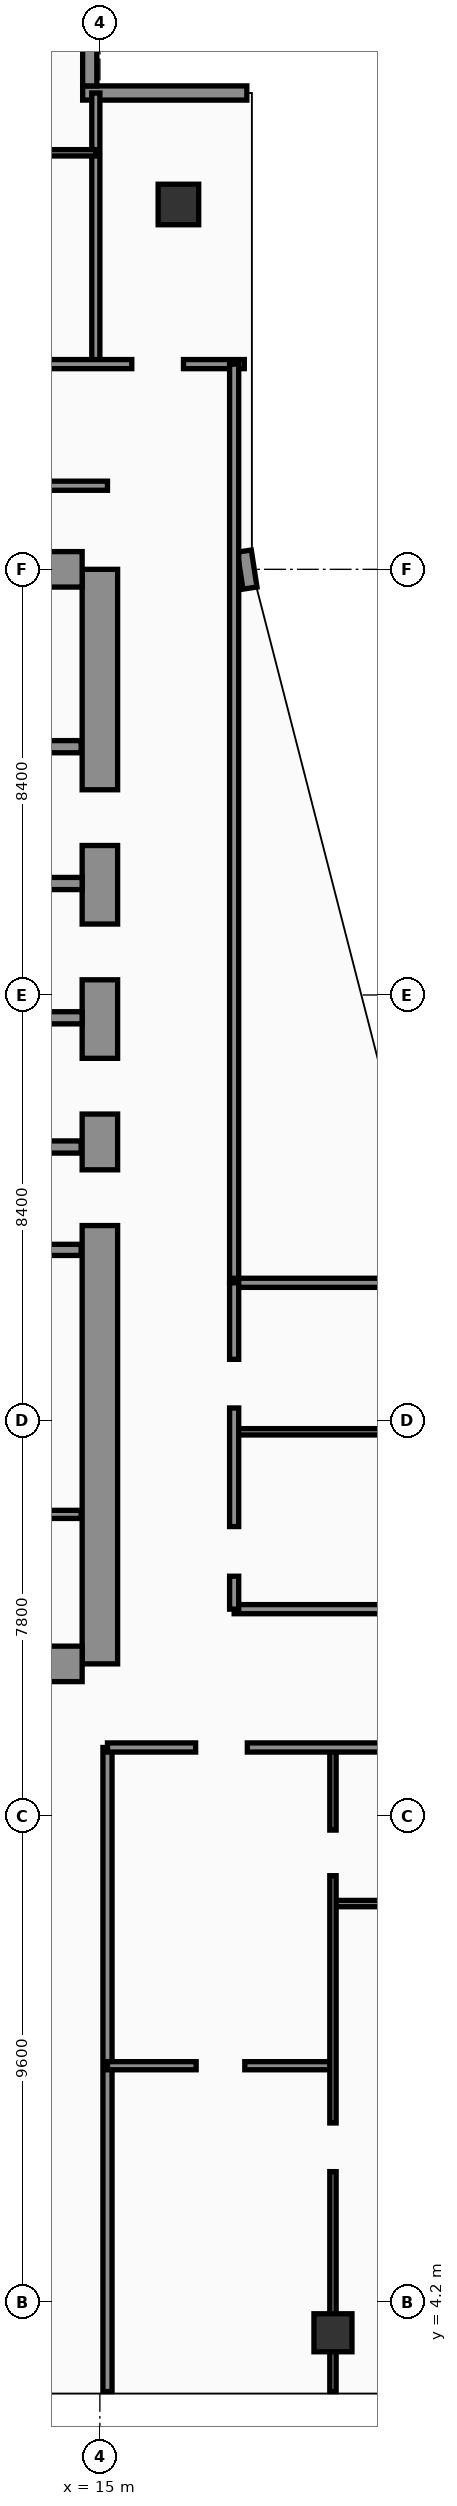
"""IFC4 building model, lengths in metres.
Left out: names, types, materials, properties, quantities, classifications, styles, units other than length and angle.
Written with IfcOpenShell. Run it as: python <this file> out.ifc"""

import sys

from ifc_helpers import new_model, si_unit, direction, frame, frame_2d, origin, origin_2d, place, context, subcontext, project, spatial, rectangle, hollow_rectangle, extrude, element, fill, save


model = new_model("IFC4")
c1 = context("Model", 3, precision=1e-05, world=origin(), true_north=direction((0.0, 1.0)))
c2 = subcontext(c1, "Body", "Model", "MODEL_VIEW")
j1 = project(units=[si_unit("LENGTHUNIT", "METRE"), si_unit("PLANEANGLEUNIT", "RADIAN")], contexts=[c1])
p1 = place(None, origin())
s1 = spatial("IfcSite", under=j1, at=p1, CompositionType="ELEMENT")
p2 = place(p1, origin())
s2 = spatial("IfcBuilding", under=s1, at=p2, CompositionType="ELEMENT")
p3 = place(p2, frame((0.0, 0.0, 211.0)))
s3 = spatial("IfcBuildingStorey", under=s2, at=p3, CompositionType="ELEMENT", Elevation=211.0)
p4 = place(p3, frame((15.0, 16.8, 0.0), z_axis=(0.0, 0.0, 1.0), x_axis=(0.0, 1.0, 0.0)))
e1 = element("IfcWall", 1, at=p4, inside=s3, PredefinedType="SHEAR", context=c2, shape_type="SweptSolid", body=[
    extrude(rectangle(XDim=21.6, YDim=0.7, at=frame_2d((10.8, 0.0))), origin(), (0.0, 0.0, 1.0), 3.56),
])
p5 = place(p4, frame((8.65, 0.0, 0.0)))
e2 = element("IfcOpeningElement", 2, at=p5, cuts=e1, PredefinedType="OPENING", context=c2, shape_type="SweptSolid", body=[
    extrude(rectangle(XDim=1.1, YDim=2.2, at=frame_2d((0.55, 1.1))), frame((0.0, 0.36, 0.0), z_axis=(0.0, -1.0, 0.0), x_axis=(1.0, 0.0, 0.0)), (0.0, 0.0, 1.0), 0.72),
])
p6 = place(p4, frame((10.85, 0.0, 0.0)))
e3 = element("IfcOpeningElement", 3, at=p6, cuts=e1, PredefinedType="OPENING", context=c2, shape_type="SweptSolid", body=[
    extrude(rectangle(XDim=1.1, YDim=2.2, at=frame_2d((0.55, 1.1))), frame((0.0, 0.36, 0.0), z_axis=(0.0, -1.0, 0.0), x_axis=(1.0, 0.0, 0.0)), (0.0, 0.0, 1.0), 0.72),
])
p7 = place(p4, frame((13.5, 0.0, 0.0)))
e4 = element("IfcOpeningElement", 4, at=p7, cuts=e1, PredefinedType="OPENING", context=c2, shape_type="SweptSolid", body=[
    extrude(rectangle(XDim=1.1, YDim=2.2, at=frame_2d((0.55, 1.1))), frame((0.0, 0.36, 0.0), z_axis=(0.0, -1.0, 0.0), x_axis=(1.0, 0.0, 0.0)), (0.0, 0.0, 1.0), 0.72),
])
p8 = place(p4, frame((16.15, 0.0, 0.0)))
e5 = element("IfcOpeningElement", 5, at=p8, cuts=e1, PredefinedType="OPENING", context=c2, shape_type="SweptSolid", body=[
    extrude(rectangle(XDim=1.1, YDim=2.2, at=frame_2d((0.55, 1.1))), frame((0.0, 0.36, 0.0), z_axis=(0.0, -1.0, 0.0), x_axis=(1.0, 0.0, 0.0)), (0.0, 0.0, 1.0), 0.72),
])
for number, where, z_axis, x_axis in (
    (6, (4.55, 38.4, 0.0), (0.0, 0.0, 1.0), (1.0, 0.0, 0.0)),
    (7, (4.55, 16.8, 0.0), (0.0, 0.0, 1.0), (1.0, 0.0, 0.0)),
):
    element("IfcWall", number, at=place(p3, frame(where, z_axis=z_axis, x_axis=x_axis)), inside=s3, PredefinedType="SHEAR", context=c2, shape_type="SweptSolid", body=[
        extrude(rectangle(XDim=10.1, YDim=0.7, at=frame_2d((5.05, 0.0))), origin(), (0.0, 0.0, 1.0), 3.56),
    ])
for number, where, z_axis, x_axis in (
    (8, (12.18, 29.55, 0.0), (0.0, 0.0, 1.0), (1.0, 0.0, 0.0)),
    (9, (12.18, 32.2, 0.0), (0.0, 0.0, 1.0), (1.0, 0.0, 0.0)),
):
    element("IfcWall", number, at=place(p3, frame(where, z_axis=z_axis, x_axis=x_axis)), inside=s3, PredefinedType="SOLIDWALL", context=c2, shape_type="SweptSolid", body=[
        extrude(rectangle(XDim=2.47, YDim=0.24, at=frame_2d((1.235, 0.0))), origin(), (0.0, 0.0, 1.0), 3.56),
    ])
p9 = place(p3, frame((16.55, 45.6, 0.0), z_axis=(0.0, 0.0, 1.0), x_axis=(1.0, 0.0, 0.0)))
e10 = element("IfcColumn", 10, at=p9, inside=s3, PredefinedType="COLUMN", context=c2, shape_type="SweptSolid", body=[
    extrude(rectangle(XDim=0.8, YDim=0.8, at=origin_2d()), origin(), (0.0, 0.0, 1.0), 3.56),
])
p10 = place(p3, frame((19.6, 3.6, 0.0), z_axis=(0.0, 0.0, 1.0), x_axis=(1.0, 0.0, 0.0)))
e11 = element("IfcColumn", 11, at=p10, inside=s3, PredefinedType="COLUMN", context=c2, shape_type="SweptSolid", body=[
    extrude(hollow_rectangle(XDim=0.75, YDim=0.75, WallThickness=0.032, at=origin_2d()), origin(), (0.0, 0.0, 1.0), 3.56),
])
p11 = place(p3, frame((17.962, 38.03, 0.0), z_axis=(0.0, 0.0, 1.0), x_axis=(-0.15141125477, 0.988470855377, 0.0)))
e12 = element("IfcWall", 12, at=p11, inside=s3, PredefinedType="SOLIDWALL", context=c2, shape_type="SweptSolid", body=[
    extrude(rectangle(XDim=0.739, YDim=0.28, at=frame_2d((0.369, 0.0))), origin(), (0.0, 0.0, 1.0), 3.56),
])
p12 = place(p3, frame((17.9, 47.8, 0.0), z_axis=(0.0, 0.0, 1.0), x_axis=(-1.0, 0.0, 0.0)))
e13 = element("IfcWall", 13, at=p12, inside=s3, PredefinedType="SOLIDWALL", context=c2, shape_type="SweptSolid", body=[
    extrude(rectangle(XDim=3.24, YDim=0.28, at=frame_2d((1.62, 0.0))), origin(), (0.0, 0.0, 1.0), 3.56),
])
p13 = place(p3, frame((14.8, 47.94, 0.0), z_axis=(0.0, 0.0, 1.0), x_axis=(0.0, 1.0, 0.0)))
e14 = element("IfcWall", 14, at=p13, inside=s3, PredefinedType="SOLIDWALL", context=c2, shape_type="SweptSolid", body=[
    extrude(rectangle(XDim=2.94, YDim=0.28, at=frame_2d((1.47, 0.0))), origin(), (0.0, 0.0, 1.0), 3.56),
])
p14 = place(p3, frame((9.68, 19.75, 0.0), z_axis=(0.0, 0.0, 1.0), x_axis=(1.0, 0.0, 0.0)))
e15 = element("IfcWall", 15, at=p14, inside=s3, PredefinedType="PARTITIONING", context=c2, shape_type="SweptSolid", body=[
    extrude(rectangle(XDim=4.95, YDim=0.16, at=frame_2d((2.475, 0.0))), origin(), (0.0, 0.0, 1.0), 3.56),
])
p15 = place(p14, frame((1.1, 0.0, 0.0)))
e16 = element("IfcOpeningElement", 16, at=p15, cuts=e15, PredefinedType="OPENING", context=c2, shape_type="SweptSolid", body=[
    extrude(rectangle(XDim=0.98, YDim=2.15, at=frame_2d((0.49, 1.075))), frame((0.0, 0.09, 0.0), z_axis=(0.0, -1.0, 0.0), x_axis=(1.0, 0.0, 0.0)), (0.0, 0.0, 1.0), 0.18),
])
p16 = place(p3, frame((9.68, 24.97, 0.0), z_axis=(0.0, 0.0, 1.0), x_axis=(1.0, 0.0, 0.0)))
e17 = element("IfcWall", 17, at=p16, inside=s3, PredefinedType="SOLIDWALL", context=c2, shape_type="SweptSolid", body=[
    extrude(rectangle(XDim=4.95, YDim=0.22, at=frame_2d((2.475, 0.0))), origin(), (0.0, 0.0, 1.0), 2.94),
])
p17 = place(p16, frame((0.9, 0.0, 0.0)))
e18 = element("IfcOpeningElement", 18, at=p17, cuts=e17, PredefinedType="OPENING", context=c2, shape_type="SweptSolid", body=[
    extrude(rectangle(XDim=0.98, YDim=2.15, at=frame_2d((0.49, 1.075))), frame((0.0, 0.12, 0.0), z_axis=(0.0, -1.0, 0.0), x_axis=(1.0, 0.0, 0.0)), (0.0, 0.0, 1.0), 0.24),
])
p18 = place(p3, frame((12.25, 27.0, 0.0), z_axis=(0.0, 0.0, 1.0), x_axis=(1.0, 0.0, 0.0)))
e19 = element("IfcWall", 19, at=p18, inside=s3, PredefinedType="SOLIDWALL", context=c2, shape_type="SweptSolid", body=[
    extrude(rectangle(XDim=2.38, YDim=0.24, at=frame_2d((1.19, 0.0))), origin(), (0.0, 0.0, 1.0), 3.56),
])
p19 = place(p3, frame((9.66, 34.9, 0.0), z_axis=(0.0, 0.0, 1.0), x_axis=(1.0, 0.0, 0.0)))
e20 = element("IfcWall", 20, at=p19, inside=s3, PredefinedType="SOLIDWALL", context=c2, shape_type="SweptSolid", body=[
    extrude(rectangle(XDim=4.97, YDim=0.24, at=frame_2d((2.485, 0.0))), origin(), (0.0, 0.0, 1.0), 3.56),
])
p20 = place(p3, frame((15.15, 2.44, 0.0), z_axis=(0.0, 0.0, 1.0), x_axis=(0.0, 1.0, 0.0)))
e21 = element("IfcWall", 21, at=p20, inside=s3, PredefinedType="PARTITIONING", context=c2, shape_type="SweptSolid", body=[
    extrude(rectangle(XDim=12.71, YDim=0.18, at=frame_2d((6.355, 0.0))), origin(), (0.0, 0.0, 1.0), 3.09),
])
p21 = place(p3, frame((19.6, 12.07, 0.0), z_axis=(0.0, 0.0, 1.0), x_axis=(1.0, 0.0, 0.0)))
e22 = element("IfcWall", 22, at=p21, inside=s3, PredefinedType="PARTITIONING", context=c2, shape_type="SweptSolid", body=[
    extrude(rectangle(XDim=2.0, YDim=0.125, at=frame_2d((1.0, 0.0))), origin(), (0.0, 0.0, 1.0), 3.56),
])
p22 = place(p3, frame((15.15, 8.87, 0.0), z_axis=(0.0, 0.0, 1.0), x_axis=(1.0, 0.0, 0.0)))
e23 = element("IfcWall", 23, at=p22, inside=s3, PredefinedType="PARTITIONING", context=c2, shape_type="SweptSolid", body=[
    extrude(rectangle(XDim=4.45, YDim=0.16, at=frame_2d((2.225, 0.0))), origin(), (0.0, 0.0, 1.0), 3.56),
])
p23 = place(p22, frame((1.75, 0.0, 0.0)))
e24 = element("IfcOpeningElement", 24, at=p23, cuts=e23, PredefinedType="OPENING", context=c2, shape_type="SweptSolid", body=[
    extrude(rectangle(XDim=0.96, YDim=2.2, at=frame_2d((0.48, 1.1))), frame((0.0, 0.09, 0.0), z_axis=(0.0, -1.0, 0.0), x_axis=(1.0, 0.0, 0.0)), (0.0, 0.0, 1.0), 0.18),
])
p24 = place(p3, frame((19.6, 2.44, 0.0), z_axis=(0.0, 0.0, 1.0), x_axis=(0.0, 1.0, 0.0)))
e25 = element("IfcWall", 25, at=p24, inside=s3, PredefinedType="PARTITIONING", context=c2, shape_type="SweptSolid", body=[
    extrude(rectangle(XDim=12.71, YDim=0.125, at=frame_2d((6.355, 0.0))), origin(), (0.0, 0.0, 1.0), 2.59),
])
p25 = place(p24, frame((4.34, 0.0, 0.0)))
e26 = element("IfcOpeningElement", 26, at=p25, cuts=e25, PredefinedType="OPENING", context=c2, shape_type="SweptSolid", body=[
    extrude(rectangle(XDim=0.96, YDim=2.2, at=frame_2d((0.48, 1.1))), frame((0.0, 0.073, 0.0), z_axis=(0.0, -1.0, 0.0), x_axis=(1.0, 0.0, 0.0)), (0.0, 0.0, 1.0), 0.145),
])
p26 = place(p24, frame((10.18, 0.0, 0.0)))
e27 = element("IfcOpeningElement", 27, at=p26, cuts=e25, PredefinedType="OPENING", context=c2, shape_type="SweptSolid", body=[
    extrude(rectangle(XDim=0.9, YDim=2.15, at=frame_2d((0.45, 1.075))), frame((0.0, 0.073, 0.0), z_axis=(0.0, -1.0, 0.0), x_axis=(1.0, 0.0, 0.0)), (0.0, 0.0, 1.0), 0.145),
])
p27 = place(p3, frame((15.15, 15.15, 0.0), z_axis=(0.0, 0.0, 1.0), x_axis=(1.0, 0.0, 0.0)))
e28 = element("IfcWall", 28, at=p27, inside=s3, PredefinedType="PARTITIONING", context=c2, shape_type="SweptSolid", body=[
    extrude(rectangle(XDim=6.45, YDim=0.18, at=frame_2d((3.225, 0.0))), origin(), (0.0, 0.0, 1.0), 2.59),
])
p28 = place(p27, frame((1.74, 0.0, 0.0)))
e29 = element("IfcOpeningElement", 29, at=p28, cuts=e28, PredefinedType="OPENING", context=c2, shape_type="SweptSolid", body=[
    extrude(rectangle(XDim=1.02, YDim=2.2, at=frame_2d((0.51, 1.1))), frame((0.0, 0.1, 0.0), z_axis=(0.0, -1.0, 0.0), x_axis=(1.0, 0.0, 0.0)), (0.0, 0.0, 1.0), 0.2),
])
p29 = place(p3, frame((14.92, 42.45, 0.0), z_axis=(0.0, 0.0, 1.0), x_axis=(0.0, 1.0, 0.0)))
e30 = element("IfcWall", 30, at=p29, inside=s3, PredefinedType="PARTITIONING", context=c2, shape_type="SweptSolid", body=[
    extrude(rectangle(XDim=5.35, YDim=0.16, at=frame_2d((2.675, 0.0))), origin(), (0.0, 0.0, 1.0), 3.09),
])
p30 = place(p3, frame((12.99, 46.62, 0.0), z_axis=(0.0, 0.0, 1.0), x_axis=(1.0, 0.0, 0.0)))
e31 = element("IfcWall", 31, at=p30, inside=s3, PredefinedType="PARTITIONING", context=c2, shape_type="SweptSolid", body=[
    extrude(rectangle(XDim=1.93, YDim=0.125, at=frame_2d((0.965, 0.0))), origin(), (0.0, 0.0, 1.0), 3.09),
])
p31 = place(p3, frame((0.08, 42.45, 0.0), z_axis=(0.0, 0.0, 1.0), x_axis=(1.0, 0.0, 0.0)))
e32 = element("IfcWall", 32, at=p31, inside=s3, PredefinedType="PARTITIONING", context=c2, shape_type="SweptSolid", body=[
    extrude(rectangle(XDim=17.77, YDim=0.18, at=frame_2d((8.885, 0.0))), origin(), (0.0, 0.0, 1.0), 2.94),
])
p32 = place(p31, frame((0.9, 0.0, 0.0)))
e33 = element("IfcOpeningElement", 33, at=p32, cuts=e32, PredefinedType="OPENING", context=c2, shape_type="SweptSolid", body=[
    extrude(rectangle(XDim=1.02, YDim=2.2, at=frame_2d((0.51, 1.1))), frame((0.0, 0.1, 0.0), z_axis=(0.0, -1.0, 0.0), x_axis=(1.0, 0.0, 0.0)), (0.0, 0.0, 1.0), 0.2),
])
p33 = place(p31, frame((4.45, 0.0, 0.0)))
e34 = element("IfcOpeningElement", 34, at=p33, cuts=e32, PredefinedType="OPENING", context=c2, shape_type="SweptSolid", body=[
    extrude(rectangle(XDim=1.02, YDim=2.2, at=frame_2d((0.51, 1.1))), frame((0.0, 0.1, 0.0), z_axis=(0.0, -1.0, 0.0), x_axis=(1.0, 0.0, 0.0)), (0.0, 0.0, 1.0), 0.2),
])
p34 = place(p31, frame((10.33, 0.0, 0.0)))
e35 = element("IfcOpeningElement", 35, at=p34, cuts=e32, PredefinedType="OPENING", context=c2, shape_type="SweptSolid", body=[
    extrude(rectangle(XDim=1.02, YDim=2.2, at=frame_2d((0.51, 1.1))), frame((0.0, 0.1, 0.0), z_axis=(0.0, -1.0, 0.0), x_axis=(1.0, 0.0, 0.0)), (0.0, 0.0, 1.0), 0.2),
])
p35 = place(p31, frame((15.55, 0.0, 0.0)))
e36 = element("IfcOpeningElement", 36, at=p35, cuts=e32, PredefinedType="OPENING", context=c2, shape_type="SweptSolid", body=[
    extrude(rectangle(XDim=1.02, YDim=2.2, at=frame_2d((0.51, 1.1))), frame((0.0, 0.1, 0.0), z_axis=(0.0, -1.0, 0.0), x_axis=(1.0, 0.0, 0.0)), (0.0, 0.0, 1.0), 0.2),
])
p36 = place(p3, frame((17.65, 24.3, 0.0), z_axis=(0.0, 0.0, 1.0), x_axis=(0.0, 1.0, 0.0)))
e37 = element("IfcWall", 37, at=p36, inside=s3, PredefinedType="PARTITIONING", context=c2, shape_type="SweptSolid", body=[
    extrude(rectangle(XDim=18.15, YDim=0.18, at=frame_2d((9.075, 0.0))), origin(), (0.0, 0.0, 1.0), 2.94),
])
p37 = place(p3, frame((3.83, 40.05, 0.0), z_axis=(0.0, 0.0, 1.0), x_axis=(1.0, 0.0, 0.0)))
e38 = element("IfcWall", 38, at=p37, inside=s3, PredefinedType="PARTITIONING", context=c2, shape_type="SweptSolid", body=[
    extrude(rectangle(XDim=11.32, YDim=0.18, at=frame_2d((5.66, 0.0))), origin(), (0.0, 0.0, 1.0), 2.94),
])
p38 = place(p3, frame((17.65, 17.88, 0.0), z_axis=(0.0, 0.0, 1.0), x_axis=(1.0, 0.0, 0.0)))
e39 = element("IfcWall", 39, at=p38, inside=s3, PredefinedType="PARTITIONING", context=c2, shape_type="SweptSolid", body=[
    extrude(rectangle(XDim=3.9, YDim=0.18, at=frame_2d((1.95, 0.0))), origin(), (0.0, 0.0, 1.0), 3.56),
])
p39 = place(p3, frame((17.65, 21.38, 0.0), z_axis=(0.0, 0.0, 1.0), x_axis=(1.0, 0.0, 0.0)))
e40 = element("IfcWall", 40, at=p39, inside=s3, PredefinedType="PARTITIONING", context=c2, shape_type="SweptSolid", body=[
    extrude(rectangle(XDim=3.9, YDim=0.125, at=frame_2d((1.95, 0.0))), origin(), (0.0, 0.0, 1.0), 3.56),
])
p40 = place(p3, frame((17.65, 24.32, 0.0), z_axis=(0.0, 0.0, 1.0), x_axis=(1.0, 0.0, 0.0)))
e41 = element("IfcWall", 41, at=p40, inside=s3, PredefinedType="PARTITIONING", context=c2, shape_type="SweptSolid", body=[
    extrude(rectangle(XDim=3.95, YDim=0.18, at=frame_2d((1.975, 0.0))), origin(), (0.0, 0.0, 1.0), 3.56),
])
p41 = place(p3, frame((17.65, 17.88, 0.0), z_axis=(0.0, 0.0, 1.0), x_axis=(0.0, 1.0, 0.0)))
e42 = element("IfcWall", 42, at=p41, inside=s3, PredefinedType="PARTITIONING", context=c2, shape_type="SweptSolid", body=[
    extrude(rectangle(XDim=6.44, YDim=0.18, at=frame_2d((3.22, 0.0))), origin(), (0.0, 0.0, 1.0), 3.56),
])
p42 = place(p41, frame((0.65, 0.0, 0.0)))
e43 = element("IfcOpeningElement", 43, at=p42, cuts=e42, PredefinedType="OPENING", context=c2, shape_type="SweptSolid", body=[
    extrude(rectangle(XDim=0.98, YDim=2.15, at=frame_2d((0.49, 1.075))), frame((0.0, 0.1, 0.0), z_axis=(0.0, -1.0, 0.0), x_axis=(1.0, 0.0, 0.0)), (0.0, 0.0, 1.0), 0.2),
])
p43 = place(p41, frame((3.97, 0.0, 0.0)))
e44 = element("IfcOpeningElement", 44, at=p43, cuts=e42, PredefinedType="OPENING", context=c2, shape_type="SweptSolid", body=[
    extrude(rectangle(XDim=0.96, YDim=2.2, at=frame_2d((0.48, 1.1))), frame((0.0, 0.1, 0.0), z_axis=(0.0, -1.0, 0.0), x_axis=(1.0, 0.0, 0.0)), (0.0, 0.0, 1.0), 0.2),
])
p44 = place(p23, origin())
e45 = element("IfcDoor", 45, at=p44, inside=s3, OperationType="SINGLE_SWING_LEFT", PredefinedType="DOOR", context=c2, shape_type="SweptSolid", body=[
    extrude(rectangle(XDim=0.96, YDim=2.2, at=frame_2d((0.48, 1.1))), frame((0.0, 0.025, 0.0), z_axis=(0.0, -1.0, 0.0), x_axis=(1.0, 0.0, 0.0)), (0.0, 0.0, 1.0), 0.05),
])
fill(e24, e45)
p45 = place(p25, origin())
e46 = element("IfcDoor", 46, at=p45, inside=s3, OperationType="SINGLE_SWING_LEFT", PredefinedType="DOOR", context=c2, shape_type="SweptSolid", body=[
    extrude(rectangle(XDim=0.96, YDim=2.2, at=frame_2d((0.48, 1.1))), frame((0.0, 0.025, 0.0), z_axis=(0.0, -1.0, 0.0), x_axis=(1.0, 0.0, 0.0)), (0.0, 0.0, 1.0), 0.05),
])
fill(e26, e46)
p46 = place(p26, origin())
e47 = element("IfcDoor", 47, at=p46, inside=s3, OperationType="SINGLE_SWING_RIGHT", PredefinedType="DOOR", context=c2, shape_type="SweptSolid", body=[
    extrude(rectangle(XDim=0.9, YDim=2.15, at=frame_2d((0.45, 1.075))), frame((0.0, 0.025, 0.0), z_axis=(0.0, -1.0, 0.0), x_axis=(1.0, 0.0, 0.0)), (0.0, 0.0, 1.0), 0.05),
])
fill(e27, e47)
p47 = place(p28, origin())
e48 = element("IfcDoor", 48, at=p47, inside=s3, OperationType="SINGLE_SWING_LEFT", PredefinedType="DOOR", context=c2, shape_type="SweptSolid", body=[
    extrude(rectangle(XDim=1.02, YDim=2.2, at=frame_2d((0.51, 1.1))), frame((0.0, 0.025, 0.0), z_axis=(0.0, -1.0, 0.0), x_axis=(1.0, 0.0, 0.0)), (0.0, 0.0, 1.0), 0.05),
])
fill(e29, e48)
p48 = place(p35, origin())
e49 = element("IfcDoor", 49, at=p48, inside=s3, OperationType="SINGLE_SWING_RIGHT", PredefinedType="DOOR", context=c2, shape_type="SweptSolid", body=[
    extrude(rectangle(XDim=1.02, YDim=2.2, at=frame_2d((0.51, 1.1))), frame((0.0, 0.025, 0.0), z_axis=(0.0, -1.0, 0.0), x_axis=(1.0, 0.0, 0.0)), (0.0, 0.0, 1.0), 0.05),
])
fill(e36, e49)
p49 = place(p42, origin())
e50 = element("IfcDoor", 50, at=p49, inside=s3, OperationType="SINGLE_SWING_LEFT", PredefinedType="DOOR", context=c2, shape_type="SweptSolid", body=[
    extrude(rectangle(XDim=0.98, YDim=2.15, at=frame_2d((0.49, 1.075))), frame((0.0, 0.025, 0.0), z_axis=(0.0, -1.0, 0.0), x_axis=(1.0, 0.0, 0.0)), (0.0, 0.0, 1.0), 0.05),
])
fill(e43, e50)
p50 = place(p43, origin())
e51 = element("IfcDoor", 51, at=p50, inside=s3, OperationType="SINGLE_SWING_RIGHT", PredefinedType="DOOR", context=c2, shape_type="SweptSolid", body=[
    extrude(rectangle(XDim=0.96, YDim=2.2, at=frame_2d((0.48, 1.1))), frame((0.0, 0.025, 0.0), z_axis=(0.0, -1.0, 0.0), x_axis=(1.0, 0.0, 0.0)), (0.0, 0.0, 1.0), 0.05),
])
fill(e44, e51)
p51 = place(p5, origin())
e52 = element("IfcDoor", 52, at=p51, inside=s3, OperationType="SINGLE_SWING_LEFT", PredefinedType="DOOR", context=c2, shape_type="SweptSolid", body=[
    extrude(rectangle(XDim=1.1, YDim=2.2, at=frame_2d((0.55, 1.1))), frame((0.0, 0.025, 0.0), z_axis=(0.0, -1.0, 0.0), x_axis=(1.0, 0.0, 0.0)), (0.0, 0.0, 1.0), 0.05),
])
fill(e2, e52)
p52 = place(p6, origin())
e53 = element("IfcDoor", 53, at=p52, inside=s3, OperationType="DOUBLE_DOOR_SLIDING", PredefinedType="DOOR", context=c2, shape_type="SweptSolid", body=[
    extrude(rectangle(XDim=1.1, YDim=2.2, at=frame_2d((0.55, 1.1))), frame((0.0, 0.025, 0.0), z_axis=(0.0, -1.0, 0.0), x_axis=(1.0, 0.0, 0.0)), (0.0, 0.0, 1.0), 0.05),
])
fill(e3, e53)
p53 = place(p7, origin())
e54 = element("IfcDoor", 54, at=p53, inside=s3, OperationType="DOUBLE_DOOR_SLIDING", PredefinedType="DOOR", context=c2, shape_type="SweptSolid", body=[
    extrude(rectangle(XDim=1.1, YDim=2.2, at=frame_2d((0.55, 1.1))), frame((0.0, 0.025, 0.0), z_axis=(0.0, -1.0, 0.0), x_axis=(1.0, 0.0, 0.0)), (0.0, 0.0, 1.0), 0.05),
])
fill(e4, e54)
p54 = place(p8, origin())
e55 = element("IfcDoor", 55, at=p54, inside=s3, OperationType="DOUBLE_DOOR_SLIDING", PredefinedType="DOOR", context=c2, shape_type="SweptSolid", body=[
    extrude(rectangle(XDim=1.1, YDim=2.2, at=frame_2d((0.55, 1.1))), frame((0.0, 0.025, 0.0), z_axis=(0.0, -1.0, 0.0), x_axis=(1.0, 0.0, 0.0)), (0.0, 0.0, 1.0), 0.05),
])
fill(e5, e55)
save(model, sys.argv[1])
